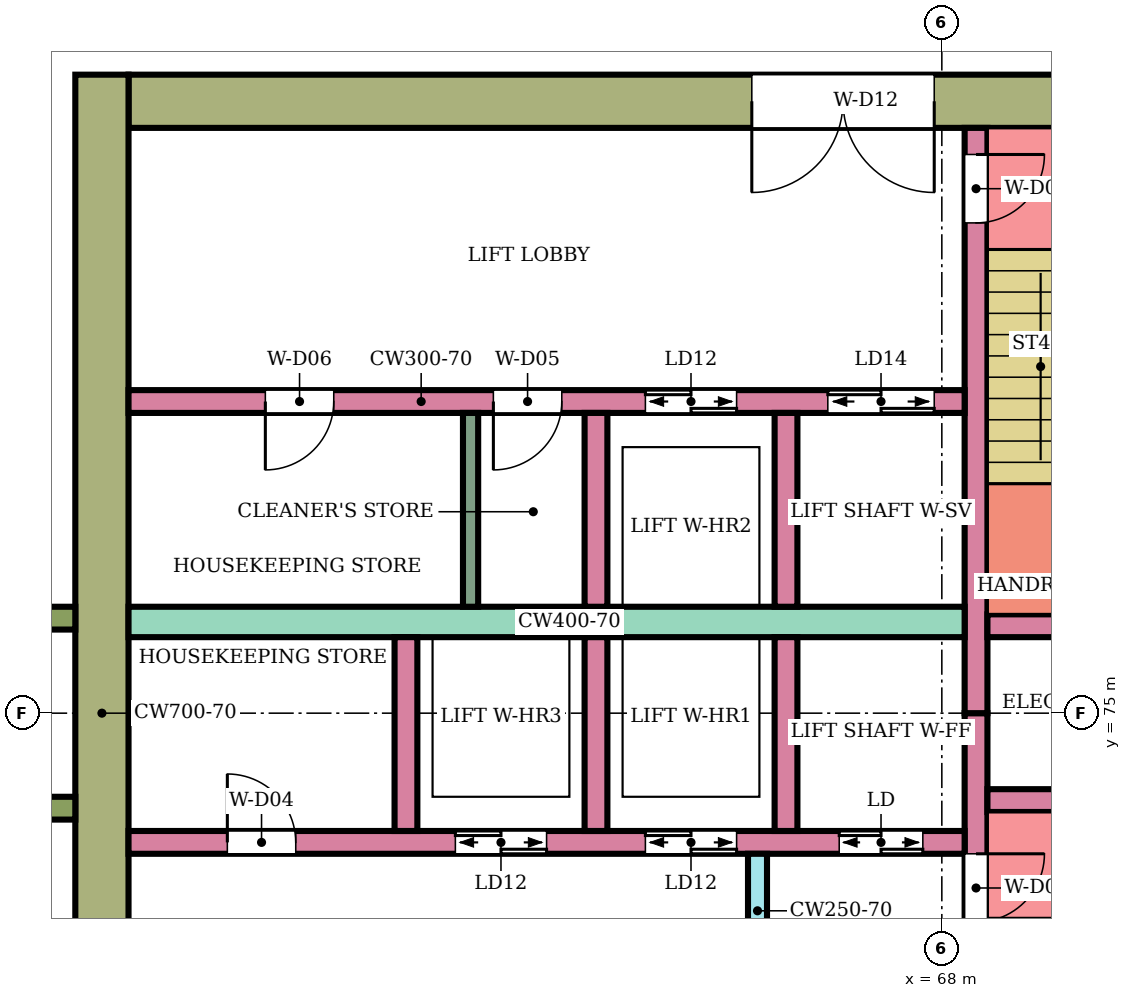
"""IFC4 building model, lengths in metres.
Left out: names, types, materials, properties, quantities, classifications, styles, units other than length and angle.
Written with IfcOpenShell. Run it as: python <this file> out.ifc"""

import sys

from ifc_helpers import new_model, si_unit, direction, frame, frame_2d, origin, place, context, subcontext, project, spatial, rectangle, extrude, element, fill, save


model = new_model("IFC4")
c1 = context("Model", 3, precision=1e-05, world=origin(), true_north=direction((0.0, 1.0)))
c2 = subcontext(c1, "Body", "Model", "MODEL_VIEW")
j1 = project(units=[si_unit("LENGTHUNIT", "METRE"), si_unit("PLANEANGLEUNIT", "RADIAN")], contexts=[c1])
p1 = place(None, origin())
s1 = spatial("IfcSite", under=j1, at=p1, CompositionType="ELEMENT")
p2 = place(p1, origin())
s2 = spatial("IfcBuilding", under=s1, at=p2, CompositionType="ELEMENT")
p3 = place(p2, frame((0.0, 0.0, 198.7)))
s3 = spatial("IfcBuildingStorey", under=s2, at=p3, CompositionType="ELEMENT", Elevation=198.7)
p4 = place(p3, frame((72.1, 83.05, 0.0), z_axis=(0.0, 0.0, 1.0), x_axis=(-1.0, 0.0, 0.0)))
e1 = element("IfcWall", 1, at=p4, inside=s3, PredefinedType="SHEAR", context=c2, shape_type="SweptSolid", body=[
    extrude(rectangle(XDim=14.8, YDim=0.7, at=frame_2d((7.4, 0.0))), origin(), (0.0, 0.0, 1.0), 3.78),
])
p5 = place(p4, frame((4.2, 0.0, 0.0)))
e2 = element("IfcOpeningElement", 2, at=p5, cuts=e1, PredefinedType="OPENING", context=c2, shape_type="SweptSolid", body=[
    extrude(rectangle(XDim=2.4, YDim=2.4, at=frame_2d((1.2, 1.2))), frame((0.0, 0.36, 0.0), z_axis=(0.0, -1.0, 0.0), x_axis=(1.0, 0.0, 0.0)), (0.0, 0.0, 1.0), 0.72),
])
p6 = place(p3, frame((56.95, 83.4, 0.0), z_axis=(0.0, 0.0, 1.0), x_axis=(0.0, -1.0, 0.0)))
e3 = element("IfcWall", 3, at=p6, inside=s3, PredefinedType="SHEAR", context=c2, shape_type="SweptSolid", body=[
    extrude(rectangle(XDim=16.8, YDim=0.7, at=frame_2d((8.4, 0.0))), origin(), (0.0, 0.0, 1.0), 3.78),
])
p7 = place(p3, frame((68.45, 75.0, 0.0), z_axis=(0.0, 0.0, 1.0), x_axis=(0.0, -1.0, 0.0)))
e4 = element("IfcWall", 4, at=p7, inside=s3, PredefinedType="SHEAR", context=c2, shape_type="SweptSolid", body=[
    extrude(rectangle(XDim=7.7, YDim=0.3, at=frame_2d((3.85, 0.0))), origin(), (0.0, 0.0, 1.0), 3.78),
])
p8 = place(p7, frame((1.85, 0.0, 0.0)))
e5 = element("IfcOpeningElement", 5, at=p8, cuts=e4, PredefinedType="OPENING", context=c2, shape_type="SweptSolid", body=[
    extrude(rectangle(XDim=0.9, YDim=2.1, at=frame_2d((0.45, 1.05))), frame((0.0, 0.16, 0.0), z_axis=(0.0, -1.0, 0.0), x_axis=(1.0, 0.0, 0.0)), (0.0, 0.0, 1.0), 0.32),
])
p9 = place(p3, frame((68.45, 82.7, 0.0), z_axis=(0.0, 0.0, 1.0), x_axis=(0.0, -1.0, 0.0)))
e6 = element("IfcWall", 6, at=p9, inside=s3, PredefinedType="SHEAR", context=c2, shape_type="SweptSolid", body=[
    extrude(rectangle(XDim=7.7, YDim=0.3, at=frame_2d((3.85, 0.0))), origin(), (0.0, 0.0, 1.0), 3.78),
])
p10 = place(p9, frame((0.35, 0.0, 0.0)))
e7 = element("IfcOpeningElement", 7, at=p10, cuts=e6, PredefinedType="OPENING", context=c2, shape_type="SweptSolid", body=[
    extrude(rectangle(XDim=0.9, YDim=2.1, at=frame_2d((0.45, 1.05))), frame((0.0, 0.16, 0.0), z_axis=(0.0, -1.0, 0.0), x_axis=(1.0, 0.0, 0.0)), (0.0, 0.0, 1.0), 0.32),
])
p11 = place(p3, frame((71.65, 73.85, 0.0), z_axis=(0.0, 0.0, 1.0), x_axis=(-1.0, 0.0, 0.0)))
e8 = element("IfcWall", 8, at=p11, inside=s3, PredefinedType="SHEAR", context=c2, shape_type="SweptSolid", body=[
    extrude(rectangle(XDim=3.05, YDim=0.3, at=frame_2d((1.525, 0.0))), origin(), (0.0, 0.0, 1.0), 3.78),
])
p12 = place(p11, frame((1.1, 0.0, 0.0)))
e9 = element("IfcOpeningElement", 9, at=p12, cuts=e8, PredefinedType="OPENING", context=c2, shape_type="SweptSolid", body=[
    extrude(rectangle(XDim=0.7, YDim=2.0, at=frame_2d((0.35, 1.0))), frame((0.0, 0.16, 0.0), z_axis=(0.0, -1.0, 0.0), x_axis=(1.0, 0.0, 0.0)), (0.0, 0.0, 1.0), 0.32),
])
p13 = place(p3, frame((71.65, 76.15, 0.0), z_axis=(0.0, 0.0, 1.0), x_axis=(-1.0, 0.0, 0.0)))
e10 = element("IfcWall", 10, at=p13, inside=s3, PredefinedType="SHEAR", context=c2, shape_type="SweptSolid", body=[
    extrude(rectangle(XDim=3.05, YDim=0.3, at=frame_2d((1.525, 0.0))), origin(), (0.0, 0.0, 1.0), 3.78),
])
p14 = place(p3, frame((68.3, 73.3, 0.0), z_axis=(0.0, 0.0, 1.0), x_axis=(-1.0, 0.0, 0.0)))
e11 = element("IfcWall", 11, at=p14, inside=s3, PredefinedType="SHEAR", context=c2, shape_type="SweptSolid", body=[
    extrude(rectangle(XDim=11.0, YDim=0.3, at=frame_2d((5.5, 0.0))), origin(), (0.0, 0.0, 1.0), 3.78),
])
p15 = place(p14, frame((0.55, 0.0, 0.0)))
e12 = element("IfcOpeningElement", 12, at=p15, cuts=e11, PredefinedType="OPENING", context=c2, shape_type="SweptSolid", body=[
    extrude(rectangle(XDim=1.1, YDim=2.1, at=frame_2d((0.55, 1.05))), frame((0.0, 0.16, 0.0), z_axis=(0.0, -1.0, 0.0), x_axis=(1.0, 0.0, 0.0)), (0.0, 0.0, 1.0), 0.32),
])
p16 = place(p14, frame((3.0, 0.0, 0.0)))
e13 = element("IfcOpeningElement", 13, at=p16, cuts=e11, PredefinedType="OPENING", context=c2, shape_type="SweptSolid", body=[
    extrude(rectangle(XDim=1.2, YDim=2.1, at=frame_2d((0.6, 1.05))), frame((0.0, 0.16, 0.0), z_axis=(0.0, -1.0, 0.0), x_axis=(1.0, 0.0, 0.0)), (0.0, 0.0, 1.0), 0.32),
])
p17 = place(p14, frame((5.5, 0.0, 0.0)))
e14 = element("IfcOpeningElement", 14, at=p17, cuts=e11, PredefinedType="OPENING", context=c2, shape_type="SweptSolid", body=[
    extrude(rectangle(XDim=1.2, YDim=2.1, at=frame_2d((0.6, 1.05))), frame((0.0, 0.16, 0.0), z_axis=(0.0, -1.0, 0.0), x_axis=(1.0, 0.0, 0.0)), (0.0, 0.0, 1.0), 0.32),
])
p18 = place(p14, frame((8.8, 0.0, 0.0)))
e15 = element("IfcOpeningElement", 15, at=p18, cuts=e11, PredefinedType="OPENING", context=c2, shape_type="SweptSolid", body=[
    extrude(rectangle(XDim=0.9, YDim=2.1, at=frame_2d((0.45, 1.05))), frame((0.0, 0.16, 0.0), z_axis=(0.0, -1.0, 0.0), x_axis=(1.0, 0.0, 0.0)), (0.0, 0.0, 1.0), 0.32),
])
p19 = place(p3, frame((68.3, 76.2, 0.0), z_axis=(0.0, 0.0, 1.0), x_axis=(-1.0, 0.0, 0.0)))
e16 = element("IfcWall", 16, at=p19, inside=s3, PredefinedType="SHEAR", context=c2, shape_type="SweptSolid", body=[
    extrude(rectangle(XDim=11.0, YDim=0.4, at=frame_2d((5.5, 0.0))), origin(), (0.0, 0.0, 1.0), 3.78),
])
p20 = place(p3, frame((68.3, 79.1, 0.0), z_axis=(0.0, 0.0, 1.0), x_axis=(-1.0, 0.0, 0.0)))
e17 = element("IfcWall", 17, at=p20, inside=s3, PredefinedType="SHEAR", context=c2, shape_type="SweptSolid", body=[
    extrude(rectangle(XDim=11.0, YDim=0.3, at=frame_2d((5.5, 0.0))), origin(), (0.0, 0.0, 1.0), 3.78),
])
p21 = place(p20, frame((0.4, 0.0, 0.0)))
e18 = element("IfcOpeningElement", 18, at=p21, cuts=e17, PredefinedType="OPENING", context=c2, shape_type="SweptSolid", body=[
    extrude(rectangle(XDim=1.4, YDim=2.1, at=frame_2d((0.7, 1.05))), frame((0.0, 0.16, 0.0), z_axis=(0.0, -1.0, 0.0), x_axis=(1.0, 0.0, 0.0)), (0.0, 0.0, 1.0), 0.32),
])
p22 = place(p20, frame((3.0, 0.0, 0.0)))
e19 = element("IfcOpeningElement", 19, at=p22, cuts=e17, PredefinedType="OPENING", context=c2, shape_type="SweptSolid", body=[
    extrude(rectangle(XDim=1.2, YDim=2.1, at=frame_2d((0.6, 1.05))), frame((0.0, 0.16, 0.0), z_axis=(0.0, -1.0, 0.0), x_axis=(1.0, 0.0, 0.0)), (0.0, 0.0, 1.0), 0.32),
])
p23 = place(p20, frame((5.3, 0.0, 0.0)))
e20 = element("IfcOpeningElement", 20, at=p23, cuts=e17, PredefinedType="OPENING", context=c2, shape_type="SweptSolid", body=[
    extrude(rectangle(XDim=0.9, YDim=2.1, at=frame_2d((0.45, 1.05))), frame((0.0, 0.16, 0.0), z_axis=(0.0, -1.0, 0.0), x_axis=(1.0, 0.0, 0.0)), (0.0, 0.0, 1.0), 0.32),
])
p24 = place(p20, frame((8.3, 0.0, 0.0)))
e21 = element("IfcOpeningElement", 21, at=p24, cuts=e17, PredefinedType="OPENING", context=c2, shape_type="SweptSolid", body=[
    extrude(rectangle(XDim=0.9, YDim=2.1, at=frame_2d((0.45, 1.05))), frame((0.0, 0.16, 0.0), z_axis=(0.0, -1.0, 0.0), x_axis=(1.0, 0.0, 0.0)), (0.0, 0.0, 1.0), 0.32),
])
for number, where, z_axis, x_axis in (
    (22, (65.95, 76.0, 0.0), (0.0, 0.0, 1.0), (0.0, -1.0, 0.0)),
    (23, (63.45, 76.0, 0.0), (0.0, 0.0, 1.0), (0.0, -1.0, 0.0)),
    (24, (60.95, 76.0, 0.0), (0.0, 0.0, 1.0), (0.0, -1.0, 0.0)),
    (25, (65.95, 78.95, 0.0), (0.0, 0.0, 1.0), (0.0, -1.0, 0.0)),
    (26, (63.45, 78.95, 0.0), (0.0, 0.0, 1.0), (0.0, -1.0, 0.0)),
):
    element("IfcWall", number, at=place(p3, frame(where, z_axis=z_axis, x_axis=x_axis)), inside=s3, PredefinedType="SHEAR", context=c2, shape_type="SweptSolid", body=[
        extrude(rectangle(XDim=2.55, YDim=0.3, at=frame_2d((1.275, 0.0))), origin(), (0.0, 0.0, 1.0), 3.78),
    ])
p25 = place(p3, frame((65.575, 73.15, 0.0), z_axis=(0.0, 0.0, 1.0), x_axis=(0.0, -1.0, 0.0)))
e27 = element("IfcWall", 27, at=p25, inside=s3, PredefinedType="SHEAR", context=c2, shape_type="SweptSolid", body=[
    extrude(rectangle(XDim=1.5, YDim=0.25, at=frame_2d((0.75, 0.0))), origin(), (0.0, 0.0, 1.0), 3.78),
])
for number, where, z_axis, x_axis in (
    (28, (56.6, 76.25, 0.0), (0.0, 0.0, 1.0), (-1.0, 0.0, 0.0)),
    (29, (56.6, 73.75, 0.0), (0.0, 0.0, 1.0), (-1.0, 0.0, 0.0)),
):
    element("IfcWall", number, at=place(p3, frame(where, z_axis=z_axis, x_axis=x_axis)), inside=s3, PredefinedType="NOTDEFINED", context=c2, shape_type="SweptSolid", body=[
        extrude(rectangle(XDim=2.416, YDim=0.3, at=frame_2d((1.208, 0.0))), origin(), (0.0, 0.0, 1.0), 4.1),
    ])
p26 = place(p3, frame((61.8, 78.95, 0.0), z_axis=(0.0, 0.0, 1.0), x_axis=(0.0, -1.0, 0.0)))
e30 = element("IfcWall", 30, at=p26, inside=s3, PredefinedType="PARTITIONING", context=c2, shape_type="SweptSolid", body=[
    extrude(rectangle(XDim=2.55, YDim=0.2, at=frame_2d((1.275, 0.0))), origin(), (0.0, 0.0, 1.0), 3.78),
])
p27 = place(p8, origin())
e31 = element("IfcDoor", 31, at=p27, inside=s3, OperationType="SINGLE_SWING_LEFT", PredefinedType="DOOR", context=c2, shape_type="SweptSolid", body=[
    extrude(rectangle(XDim=0.9, YDim=2.1, at=frame_2d((0.45, 1.05))), frame((0.0, 0.025, 0.0), z_axis=(0.0, -1.0, 0.0), x_axis=(1.0, 0.0, 0.0)), (0.0, 0.0, 1.0), 0.05),
])
fill(e5, e31)
p28 = place(p10, origin())
e32 = element("IfcDoor", 32, at=p28, inside=s3, OperationType="SINGLE_SWING_LEFT", PredefinedType="DOOR", context=c2, shape_type="SweptSolid", body=[
    extrude(rectangle(XDim=0.9, YDim=2.1, at=frame_2d((0.45, 1.05))), frame((0.0, 0.025, 0.0), z_axis=(0.0, -1.0, 0.0), x_axis=(1.0, 0.0, 0.0)), (0.0, 0.0, 1.0), 0.05),
])
fill(e7, e32)
p29 = place(p15, origin())
e33 = element("IfcDoor", 33, at=p29, inside=s3, OperationType="DOUBLE_DOOR_SLIDING", PredefinedType="DOOR", context=c2, shape_type="SweptSolid", body=[
    extrude(rectangle(XDim=1.1, YDim=2.1, at=frame_2d((0.55, 1.05))), frame((0.0, 0.025, 0.0), z_axis=(0.0, -1.0, 0.0), x_axis=(1.0, 0.0, 0.0)), (0.0, 0.0, 1.0), 0.05),
])
fill(e12, e33)
p30 = place(p16, origin())
e34 = element("IfcDoor", 34, at=p30, inside=s3, OperationType="DOUBLE_DOOR_SLIDING", PredefinedType="DOOR", context=c2, shape_type="SweptSolid", body=[
    extrude(rectangle(XDim=1.2, YDim=2.1, at=frame_2d((0.6, 1.05))), frame((0.0, 0.025, 0.0), z_axis=(0.0, -1.0, 0.0), x_axis=(1.0, 0.0, 0.0)), (0.0, 0.0, 1.0), 0.05),
])
fill(e13, e34)
p31 = place(p17, origin())
e35 = element("IfcDoor", 35, at=p31, inside=s3, OperationType="DOUBLE_DOOR_SLIDING", PredefinedType="DOOR", context=c2, shape_type="SweptSolid", body=[
    extrude(rectangle(XDim=1.2, YDim=2.1, at=frame_2d((0.6, 1.05))), frame((0.0, 0.025, 0.0), z_axis=(0.0, -1.0, 0.0), x_axis=(1.0, 0.0, 0.0)), (0.0, 0.0, 1.0), 0.05),
])
fill(e14, e35)
p32 = place(p18, frame((0.9, 0.0, 0.0), z_axis=(0.0, 0.0, 1.0), x_axis=(-1.0, 0.0, 0.0)))
e36 = element("IfcDoor", 36, at=p32, inside=s3, OperationType="SINGLE_SWING_LEFT", PredefinedType="DOOR", context=c2, shape_type="SweptSolid", body=[
    extrude(rectangle(XDim=0.9, YDim=2.1, at=frame_2d((0.45, 1.05))), frame((0.0, 0.025, 0.0), z_axis=(0.0, -1.0, 0.0), x_axis=(1.0, 0.0, 0.0)), (0.0, 0.0, 1.0), 0.05),
])
fill(e15, e36)
p33 = place(p21, origin())
e37 = element("IfcDoor", 37, at=p33, inside=s3, OperationType="DOUBLE_DOOR_SLIDING", PredefinedType="DOOR", context=c2, shape_type="SweptSolid", body=[
    extrude(rectangle(XDim=1.4, YDim=2.1, at=frame_2d((0.7, 1.05))), frame((0.0, 0.025, 0.0), z_axis=(0.0, -1.0, 0.0), x_axis=(1.0, 0.0, 0.0)), (0.0, 0.0, 1.0), 0.05),
])
fill(e18, e37)
p34 = place(p22, origin())
e38 = element("IfcDoor", 38, at=p34, inside=s3, OperationType="DOUBLE_DOOR_SLIDING", PredefinedType="DOOR", context=c2, shape_type="SweptSolid", body=[
    extrude(rectangle(XDim=1.2, YDim=2.1, at=frame_2d((0.6, 1.05))), frame((0.0, 0.025, 0.0), z_axis=(0.0, -1.0, 0.0), x_axis=(1.0, 0.0, 0.0)), (0.0, 0.0, 1.0), 0.05),
])
fill(e19, e38)
p35 = place(p23, origin())
e39 = element("IfcDoor", 39, at=p35, inside=s3, OperationType="SINGLE_SWING_RIGHT", PredefinedType="DOOR", context=c2, shape_type="SweptSolid", body=[
    extrude(rectangle(XDim=0.9, YDim=2.1, at=frame_2d((0.45, 1.05))), frame((0.0, 0.025, 0.0), z_axis=(0.0, -1.0, 0.0), x_axis=(1.0, 0.0, 0.0)), (0.0, 0.0, 1.0), 0.05),
])
fill(e20, e39)
p36 = place(p24, origin())
e40 = element("IfcDoor", 40, at=p36, inside=s3, OperationType="SINGLE_SWING_RIGHT", PredefinedType="DOOR", context=c2, shape_type="SweptSolid", body=[
    extrude(rectangle(XDim=0.9, YDim=2.1, at=frame_2d((0.45, 1.05))), frame((0.0, 0.025, 0.0), z_axis=(0.0, -1.0, 0.0), x_axis=(1.0, 0.0, 0.0)), (0.0, 0.0, 1.0), 0.05),
])
fill(e21, e40)
p37 = place(p5, origin())
e41 = element("IfcDoor", 41, at=p37, inside=s3, OperationType="DOUBLE_DOOR_SINGLE_SWING", PredefinedType="DOOR", context=c2, shape_type="SweptSolid", body=[
    extrude(rectangle(XDim=2.4, YDim=2.4, at=frame_2d((1.2, 1.2))), frame((0.0, 0.025, 0.0), z_axis=(0.0, -1.0, 0.0), x_axis=(1.0, 0.0, 0.0)), (0.0, 0.0, 1.0), 0.05),
])
fill(e2, e41)
save(model, sys.argv[1])
